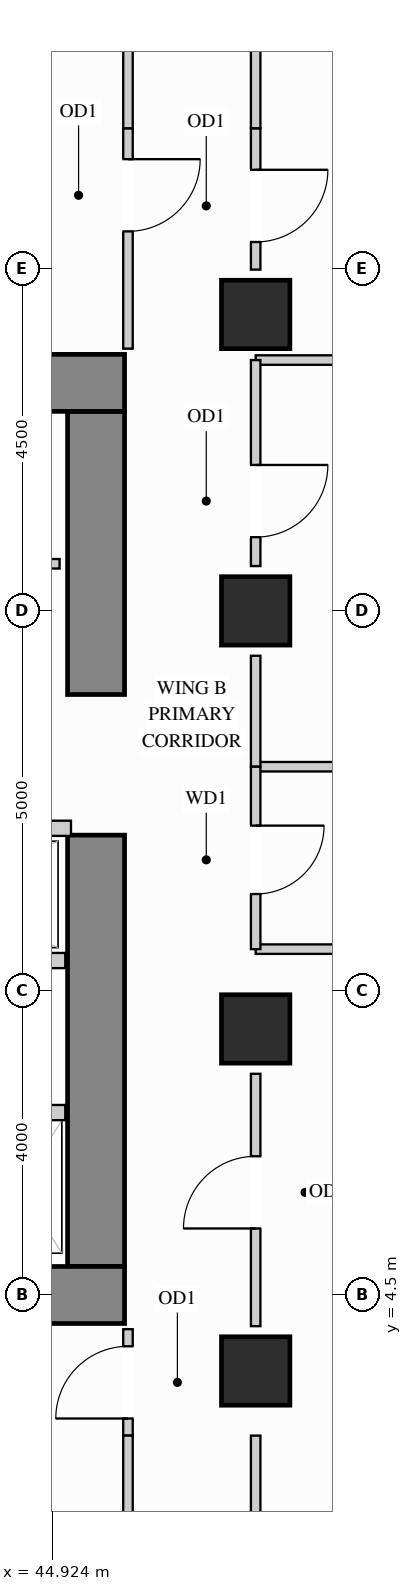
"""IFC4 building model, lengths in metres.
Left out: names, types, materials, properties, quantities, classifications, styles, units other than length and angle.
Written with IfcOpenShell. Run it as: python <this file> out.ifc"""

import sys

from ifc_helpers import new_model, si_unit, direction, frame, frame_2d, origin, origin_2d, place, context, subcontext, project, spatial, rectangle, extrude, source, transform, mapped, element, fill, save


model = new_model("IFC4")
c1 = context("Model", 3, precision=1e-05, world=origin(), true_north=direction((0.0, 1.0)))
c2 = subcontext(c1, "Body", "Model", "MODEL_VIEW")
j1 = project(units=[si_unit("LENGTHUNIT", "METRE"), si_unit("PLANEANGLEUNIT", "RADIAN")], contexts=[c1])
p1 = place(None, origin())
s1 = spatial("IfcSite", under=j1, at=p1, CompositionType="ELEMENT")
p2 = place(p1, origin())
s2 = spatial("IfcBuilding", under=s1, at=p2, CompositionType="ELEMENT")
p3 = place(p2, frame((0.0, 0.0, 106.2)))
s3 = spatial("IfcBuildingStorey", under=s2, at=p3, CompositionType="ELEMENT", Elevation=106.2)
m1 = source(origin(), c2, "Body", "SweptSolid", [
    extrude(rectangle(XDim=0.9, YDim=0.9, at=origin_2d()), origin(), (0.0, 0.0, 1.0), 3.38),
])
for number, where, z_axis, x_axis in (
    (1, (47.6, 13.5, 0.0), (0.0, 0.0, 1.0), (1.0, 0.0, 0.0)),
    (2, (47.6, 3.5, 0.0), (0.0, 0.0, 1.0), (1.0, 0.0, 0.0)),
    (3, (47.6, 8.0, 0.0), (0.0, 0.0, 1.0), (1.0, 0.0, 0.0)),
    (4, (47.6, 17.4, 0.0), (0.0, 0.0, 1.0), (1.0, 0.0, 0.0)),
):
    element("IfcColumn", number, at=place(p3, frame(where, z_axis=z_axis, x_axis=x_axis)), inside=s3, PredefinedType="COLUMN", context=c2, shape_type="MappedRepresentation", body=[
        mapped(m1, transform((0.0, 0.0, 0.0), x_axis=(1.0, 0.0, 0.0), y_axis=(0.0, 1.0, 0.0), z_axis=(0.0, 0.0, 1.0))),
    ])
m2 = source(origin(), c2, "Body", "SweptSolid", [
    extrude(rectangle(XDim=5.675, YDim=0.75, at=frame_2d((2.837, 0.0))), origin(), (0.0, 0.0, 1.0), 3.38),
])
p4 = place(p3, frame((45.5, 4.875, 0.0), z_axis=(0.0, 0.0, 1.0), x_axis=(0.0, 1.0, 0.0)))
e5 = element("IfcWall", 5, at=p4, inside=s3, PredefinedType="SHEAR", context=c2, shape_type="MappedRepresentation", body=[
    mapped(m2, transform((0.0, 0.0, 0.0), x_axis=(1.0, 0.0, 0.0), y_axis=(0.0, 1.0, 0.0), z_axis=(0.0, 0.0, 1.0))),
])
m3 = source(origin(), c2, "Body", "SweptSolid", [
    extrude(rectangle(XDim=3.725, YDim=0.75, at=frame_2d((1.863, 0.0))), origin(), (0.0, 0.0, 1.0), 3.38),
])
p5 = place(p3, frame((45.5, 12.4, 0.0), z_axis=(0.0, 0.0, 1.0), x_axis=(0.0, 1.0, 0.0)))
e6 = element("IfcWall", 6, at=p5, inside=s3, PredefinedType="SHEAR", context=c2, shape_type="MappedRepresentation", body=[
    mapped(m3, transform((0.0, 0.0, 0.0), x_axis=(1.0, 0.0, 0.0), y_axis=(0.0, 1.0, 0.0), z_axis=(0.0, 0.0, 1.0))),
])
m4 = source(origin(), c2, "Body", "SweptSolid", [
    extrude(rectangle(XDim=10.25, YDim=0.75, at=frame_2d((5.125, 0.0))), origin(), (0.0, 0.0, 1.0), 3.38),
])
for number, where, z_axis, x_axis in (
    (7, (35.625, 16.5, 0.0), (0.0, 0.0, 1.0), (1.0, 0.0, 0.0)),
    (8, (35.625, 4.5, 0.0), (0.0, 0.0, 1.0), (1.0, 0.0, 0.0)),
):
    element("IfcWall", number, at=place(p3, frame(where, z_axis=z_axis, x_axis=x_axis)), inside=s3, PredefinedType="SHEAR", context=c2, shape_type="MappedRepresentation", body=[
        mapped(m4, transform((0.0, 0.0, 0.0), x_axis=(1.0, 0.0, 0.0), y_axis=(0.0, 1.0, 0.0), z_axis=(0.0, 0.0, 1.0))),
    ])
p6 = place(p3, frame((40.75, 14.12, 0.0), z_axis=(0.0, 0.0, 1.0), x_axis=(1.0, 0.0, 0.0)))
e9 = element("IfcWall", 9, at=p6, inside=s3, PredefinedType="PARTITIONING", context=c2, shape_type="SweptSolid", body=[
    extrude(rectangle(XDim=4.27, YDim=0.125, at=frame_2d((2.135, 0.0))), origin(), (0.0, 0.0, 1.0), 3.365),
])
p7 = place(p6, frame((1.66, 0.0, 0.0)))
e10 = element("IfcOpeningElement", 10, at=p7, cuts=e9, PredefinedType="OPENING", context=c2, shape_type="SweptSolid", body=[
    extrude(rectangle(XDim=0.95, YDim=2.15, at=frame_2d((0.475, 1.075))), frame((0.0, 0.073, 0.0), z_axis=(0.0, -1.0, 0.0), x_axis=(1.0, 0.0, 0.0)), (0.0, 0.0, 1.0), 0.145),
])
m5 = source(origin(), c2, "Body", "SweptSolid", [
    extrude(rectangle(XDim=8.048, YDim=0.125, at=frame_2d((4.024, 0.0))), origin(), (0.0, 0.0, 1.0), 3.365),
])
for number, where, z_axis, x_axis in (
    (11, (47.6, 11.45, 0.0), (0.0, 0.0, 1.0), (1.0, 0.0, 0.0)),
    (12, (47.6, 16.8, 0.0), (0.0, 0.0, 1.0), (1.0, 0.0, 0.0)),
    (13, (47.6, 9.05, 0.0), (0.0, 0.0, 1.0), (1.0, 0.0, 0.0)),
):
    element("IfcWall", number, at=place(p3, frame(where, z_axis=z_axis, x_axis=x_axis)), inside=s3, PredefinedType="PARTITIONING", context=c2, shape_type="MappedRepresentation", body=[
        mapped(m5, transform((0.0, 0.0, 0.0), x_axis=(1.0, 0.0, 0.0), y_axis=(0.0, 1.0, 0.0), z_axis=(0.0, 0.0, 1.0))),
    ])
p8 = place(p3, frame((47.6, 4.09, 0.0), z_axis=(0.0, 0.0, 1.0), x_axis=(0.0, 1.0, 0.0)))
e14 = element("IfcWall", 14, at=p8, inside=s3, PredefinedType="PARTITIONING", context=c2, shape_type="SweptSolid", body=[
    extrude(rectangle(XDim=3.32, YDim=0.125, at=frame_2d((1.66, 0.0))), origin(), (0.0, 0.0, 1.0), 2.677),
])
p9 = place(p8, frame((1.285, 0.0, 0.0)))
e15 = element("IfcOpeningElement", 15, at=p9, cuts=e14, PredefinedType="OPENING", context=c2, shape_type="SweptSolid", body=[
    extrude(rectangle(XDim=0.95, YDim=2.15, at=frame_2d((0.475, 1.075))), frame((0.0, 0.073, 0.0), z_axis=(0.0, -1.0, 0.0), x_axis=(1.0, 0.0, 0.0)), (0.0, 0.0, 1.0), 0.145),
])
m6 = source(origin(), c2, "Body", "SweptSolid", [
    extrude(rectangle(XDim=1.46, YDim=0.125, at=frame_2d((0.73, 0.0))), origin(), (0.0, 0.0, 1.0), 2.677),
])
for number, where, z_axis, x_axis in (
    (16, (47.6, 1.19, 0.0), (0.0, 0.0, 1.0), (0.0, 1.0, 0.0)),
    (17, (47.6, 11.45, 0.0), (0.0, 0.0, 1.0), (0.0, 1.0, 0.0)),
):
    element("IfcWall", number, at=place(p3, frame(where, z_axis=z_axis, x_axis=x_axis)), inside=s3, PredefinedType="PARTITIONING", context=c2, shape_type="MappedRepresentation", body=[
        mapped(m6, transform((0.0, 0.0, 0.0), x_axis=(1.0, 0.0, 0.0), y_axis=(0.0, 1.0, 0.0), z_axis=(0.0, 0.0, 1.0))),
    ])
p10 = place(p3, frame((47.6, 14.09, 0.0), z_axis=(0.0, 0.0, 1.0), x_axis=(0.0, 1.0, 0.0)))
e18 = element("IfcWall", 18, at=p10, inside=s3, PredefinedType="PARTITIONING", context=c2, shape_type="SweptSolid", body=[
    extrude(rectangle(XDim=2.71, YDim=0.125, at=frame_2d((1.355, 0.0))), origin(), (0.0, 0.0, 1.0), 2.677),
])
p11 = place(p10, frame((0.38, 0.0, 0.0)))
e19 = element("IfcOpeningElement", 19, at=p11, cuts=e18, PredefinedType="OPENING", context=c2, shape_type="SweptSolid", body=[
    extrude(rectangle(XDim=0.95, YDim=2.15, at=frame_2d((0.475, 1.075))), frame((0.0, 0.073, 0.0), z_axis=(0.0, -1.0, 0.0), x_axis=(1.0, 0.0, 0.0)), (0.0, 0.0, 1.0), 0.145),
])
p12 = place(p3, frame((47.6, 17.99, 0.0), z_axis=(0.0, 0.0, 1.0), x_axis=(0.0, 1.0, 0.0)))
e20 = element("IfcWall", 20, at=p12, inside=s3, PredefinedType="PARTITIONING", context=c2, shape_type="SweptSolid", body=[
    extrude(rectangle(XDim=1.86, YDim=0.125, at=frame_2d((0.93, 0.0))), origin(), (0.0, 0.0, 1.0), 2.677),
])
p13 = place(p12, frame((0.363, 0.0, 0.0)))
e21 = element("IfcOpeningElement", 21, at=p13, cuts=e20, PredefinedType="OPENING", context=c2, shape_type="SweptSolid", body=[
    extrude(rectangle(XDim=0.95, YDim=2.15, at=frame_2d((0.475, 1.075))), frame((0.0, 0.073, 0.0), z_axis=(0.0, -1.0, 0.0), x_axis=(1.0, 0.0, 0.0)), (0.0, 0.0, 1.0), 0.145),
])
p14 = place(p3, frame((47.6, 19.85, 0.0), z_axis=(0.0, 0.0, 1.0), x_axis=(0.0, 1.0, 0.0)))
e22 = element("IfcWall", 22, at=p14, inside=s3, PredefinedType="PARTITIONING", context=c2, shape_type="MappedRepresentation", body=[
    mapped(m6, transform((0.0, 0.0, 0.0), x_axis=(1.0, 0.0, 0.0), y_axis=(0.0, 1.0, 0.0), z_axis=(0.0, 0.0, 1.0))),
])
p15 = place(p3, frame((47.6, 9.05, 0.0), z_axis=(0.0, 0.0, 1.0), x_axis=(0.0, 1.0, 0.0)))
e23 = element("IfcWall", 23, at=p15, inside=s3, PredefinedType="PARTITIONING", context=c2, shape_type="SweptSolid", body=[
    extrude(rectangle(XDim=2.4, YDim=0.125, at=frame_2d((1.2, 0.0))), origin(), (0.0, 0.0, 1.0), 2.677),
])
p16 = place(p15, frame((0.725, 0.0, 0.0)))
e24 = element("IfcOpeningElement", 24, at=p16, cuts=e23, PredefinedType="OPENING", context=c2, shape_type="SweptSolid", body=[
    extrude(rectangle(XDim=0.9, YDim=2.15, at=frame_2d((0.45, 1.075))), frame((0.0, 0.073, 0.0), z_axis=(0.0, -1.0, 0.0), x_axis=(1.0, 0.0, 0.0)), (0.0, 0.0, 1.0), 0.145),
])
p17 = place(p3, frame((45.92, 16.95, 0.0), z_axis=(0.0, 0.0, 1.0), x_axis=(0.0, 1.0, 0.0)))
e25 = element("IfcWall", 25, at=p17, inside=s3, PredefinedType="PARTITIONING", context=c2, shape_type="SweptSolid", body=[
    extrude(rectangle(XDim=2.9, YDim=0.125, at=frame_2d((1.45, 0.0))), origin(), (0.0, 0.0, 1.0), 3.365),
])
p18 = place(p17, frame((1.543, 0.0, 0.0)))
e26 = element("IfcOpeningElement", 26, at=p18, cuts=e25, PredefinedType="OPENING", context=c2, shape_type="SweptSolid", body=[
    extrude(rectangle(XDim=0.95, YDim=2.15, at=frame_2d((0.475, 1.075))), frame((0.0, 0.073, 0.0), z_axis=(0.0, -1.0, 0.0), x_axis=(1.0, 0.0, 0.0)), (0.0, 0.0, 1.0), 0.145),
])
m7 = source(origin(), c2, "Body", "SweptSolid", [
    extrude(rectangle(XDim=2.298, YDim=0.125, at=frame_2d((1.149, 0.0))), origin(), (0.0, 0.0, 1.0), 3.365),
])
p19 = place(p3, frame((45.92, 19.85, 0.0), z_axis=(0.0, 0.0, 1.0), x_axis=(0.0, 1.0, 0.0)))
e27 = element("IfcWall", 27, at=p19, inside=s3, PredefinedType="PARTITIONING", context=c2, shape_type="MappedRepresentation", body=[
    mapped(m7, transform((0.0, 0.0, 0.0), x_axis=(1.0, 0.0, 0.0), y_axis=(0.0, 1.0, 0.0), z_axis=(0.0, 0.0, 1.0))),
])
p20 = place(p3, frame((45.92, 2.65, 0.0), z_axis=(0.0, 0.0, 1.0), x_axis=(0.0, 1.0, 0.0)))
e28 = element("IfcWall", 28, at=p20, inside=s3, PredefinedType="PARTITIONING", context=c2, shape_type="SweptSolid", body=[
    extrude(rectangle(XDim=1.4, YDim=0.125, at=frame_2d((0.7, 0.0))), origin(), (0.0, 0.0, 1.0), 3.365),
])
p21 = place(p20, frame((0.225, 0.0, 0.0)))
e29 = element("IfcOpeningElement", 29, at=p21, cuts=e28, PredefinedType="OPENING", context=c2, shape_type="SweptSolid", body=[
    extrude(rectangle(XDim=0.95, YDim=2.15, at=frame_2d((0.475, 1.075))), frame((0.0, 0.073, 0.0), z_axis=(0.0, -1.0, 0.0), x_axis=(1.0, 0.0, 0.0)), (0.0, 0.0, 1.0), 0.145),
])
p22 = place(p3, frame((45.92, 0.352, 0.0), z_axis=(0.0, 0.0, 1.0), x_axis=(0.0, 1.0, 0.0)))
e30 = element("IfcWall", 30, at=p22, inside=s3, PredefinedType="PARTITIONING", context=c2, shape_type="MappedRepresentation", body=[
    mapped(m7, transform((0.0, 0.0, 0.0), x_axis=(1.0, 0.0, 0.0), y_axis=(0.0, 1.0, 0.0), z_axis=(0.0, 0.0, 1.0))),
])
m8 = source(origin(), c2, "Body", "SweptSolid", [
    extrude(rectangle(XDim=1.245, YDim=0.2, at=frame_2d((0.623, 0.0))), origin(), (0.0, 0.0, 1.0), 3.365),
])
p23 = place(p3, frame((43.85, 6.9, 0.0), z_axis=(0.0, 0.0, 1.0), x_axis=(1.0, 0.0, 0.0)))
e31 = element("IfcWall", 31, at=p23, inside=s3, PredefinedType="PARTITIONING", context=c2, shape_type="MappedRepresentation", body=[
    mapped(m8, transform((0.0, 0.0, 0.0), x_axis=(1.0, 0.0, 0.0), y_axis=(0.0, 1.0, 0.0), z_axis=(0.0, 0.0, 1.0))),
])
m9 = source(origin(), c2, "Body", "SweptSolid", [
    extrude(rectangle(XDim=3.49, YDim=0.2, at=frame_2d((1.745, 0.0))), origin(), (0.0, 0.0, 1.0), 3.365),
])
p24 = place(p3, frame((41.68, 10.64, 0.0), z_axis=(0.0, 0.0, 1.0), x_axis=(1.0, 0.0, 0.0)))
e32 = element("IfcWall", 32, at=p24, inside=s3, PredefinedType="PARTITIONING", context=c2, shape_type="MappedRepresentation", body=[
    mapped(m9, transform((0.0, 0.0, 0.0), x_axis=(1.0, 0.0, 0.0), y_axis=(0.0, 1.0, 0.0), z_axis=(0.0, 0.0, 1.0))),
])
m10 = source(origin(), c2, "Body", "SweptSolid", [
    extrude(rectangle(XDim=3.415, YDim=0.2, at=frame_2d((1.708, 0.0))), origin(), (0.0, 0.0, 1.0), 3.365),
])
p25 = place(p3, frame((41.68, 8.9, 0.0), z_axis=(0.0, 0.0, 1.0), x_axis=(1.0, 0.0, 0.0)))
e33 = element("IfcWall", 33, at=p25, inside=s3, PredefinedType="PARTITIONING", context=c2, shape_type="MappedRepresentation", body=[
    mapped(m10, transform((0.0, 0.0, 0.0), x_axis=(1.0, 0.0, 0.0), y_axis=(0.0, 1.0, 0.0), z_axis=(0.0, 0.0, 1.0))),
])
m11 = source(origin(), c2, "Body", "SweptSolid", [
    extrude(rectangle(XDim=0.95, YDim=2.15, at=frame_2d((0.475, 1.075))), frame((0.0, 0.025, 0.0), z_axis=(0.0, -1.0, 0.0), x_axis=(1.0, 0.0, 0.0)), (0.0, 0.0, 1.0), 0.05),
])
p26 = place(p18, origin())
e34 = element("IfcDoor", 34, at=p26, inside=s3, OperationType="SINGLE_SWING_RIGHT", PredefinedType="DOOR", context=c2, shape_type="MappedRepresentation", body=[
    mapped(m11, transform((0.0, 0.0, 0.0), x_axis=(1.0, 0.0, 0.0), y_axis=(0.0, 1.0, 0.0), z_axis=(0.0, 0.0, 1.0))),
])
fill(e26, e34)
p27 = place(p21, origin())
e35 = element("IfcDoor", 35, at=p27, inside=s3, OperationType="SINGLE_SWING_LEFT", PredefinedType="DOOR", context=c2, shape_type="MappedRepresentation", body=[
    mapped(m11, transform((0.0, 0.0, 0.0), x_axis=(1.0, 0.0, 0.0), y_axis=(0.0, 1.0, 0.0), z_axis=(0.0, 0.0, 1.0))),
])
fill(e29, e35)
p28 = place(p9, origin())
e36 = element("IfcDoor", 36, at=p28, inside=s3, OperationType="SINGLE_SWING_LEFT", PredefinedType="DOOR", context=c2, shape_type="MappedRepresentation", body=[
    mapped(m11, transform((0.0, 0.0, 0.0), x_axis=(1.0, 0.0, 0.0), y_axis=(0.0, 1.0, 0.0), z_axis=(0.0, 0.0, 1.0))),
])
fill(e15, e36)
p29 = place(p11, origin())
e37 = element("IfcDoor", 37, at=p29, inside=s3, OperationType="SINGLE_SWING_RIGHT", PredefinedType="DOOR", context=c2, shape_type="MappedRepresentation", body=[
    mapped(m11, transform((0.0, 0.0, 0.0), x_axis=(1.0, 0.0, 0.0), y_axis=(0.0, 1.0, 0.0), z_axis=(0.0, 0.0, 1.0))),
])
fill(e19, e37)
p30 = place(p13, origin())
e38 = element("IfcDoor", 38, at=p30, inside=s3, OperationType="SINGLE_SWING_RIGHT", PredefinedType="DOOR", context=c2, shape_type="MappedRepresentation", body=[
    mapped(m11, transform((0.0, 0.0, 0.0), x_axis=(1.0, 0.0, 0.0), y_axis=(0.0, 1.0, 0.0), z_axis=(0.0, 0.0, 1.0))),
])
fill(e21, e38)
m12 = source(origin(), c2, "Body", "SweptSolid", [
    extrude(rectangle(XDim=0.9, YDim=2.15, at=frame_2d((0.45, 1.075))), frame((0.0, 0.025, 0.0), z_axis=(0.0, -1.0, 0.0), x_axis=(1.0, 0.0, 0.0)), (0.0, 0.0, 1.0), 0.05),
])
p31 = place(p16, origin())
e39 = element("IfcDoor", 39, at=p31, inside=s3, OperationType="SINGLE_SWING_RIGHT", PredefinedType="DOOR", context=c2, shape_type="MappedRepresentation", body=[
    mapped(m12, transform((0.0, 0.0, 0.0), x_axis=(1.0, 0.0, 0.0), y_axis=(0.0, 1.0, 0.0), z_axis=(0.0, 0.0, 1.0))),
])
fill(e24, e39)
save(model, sys.argv[1])
